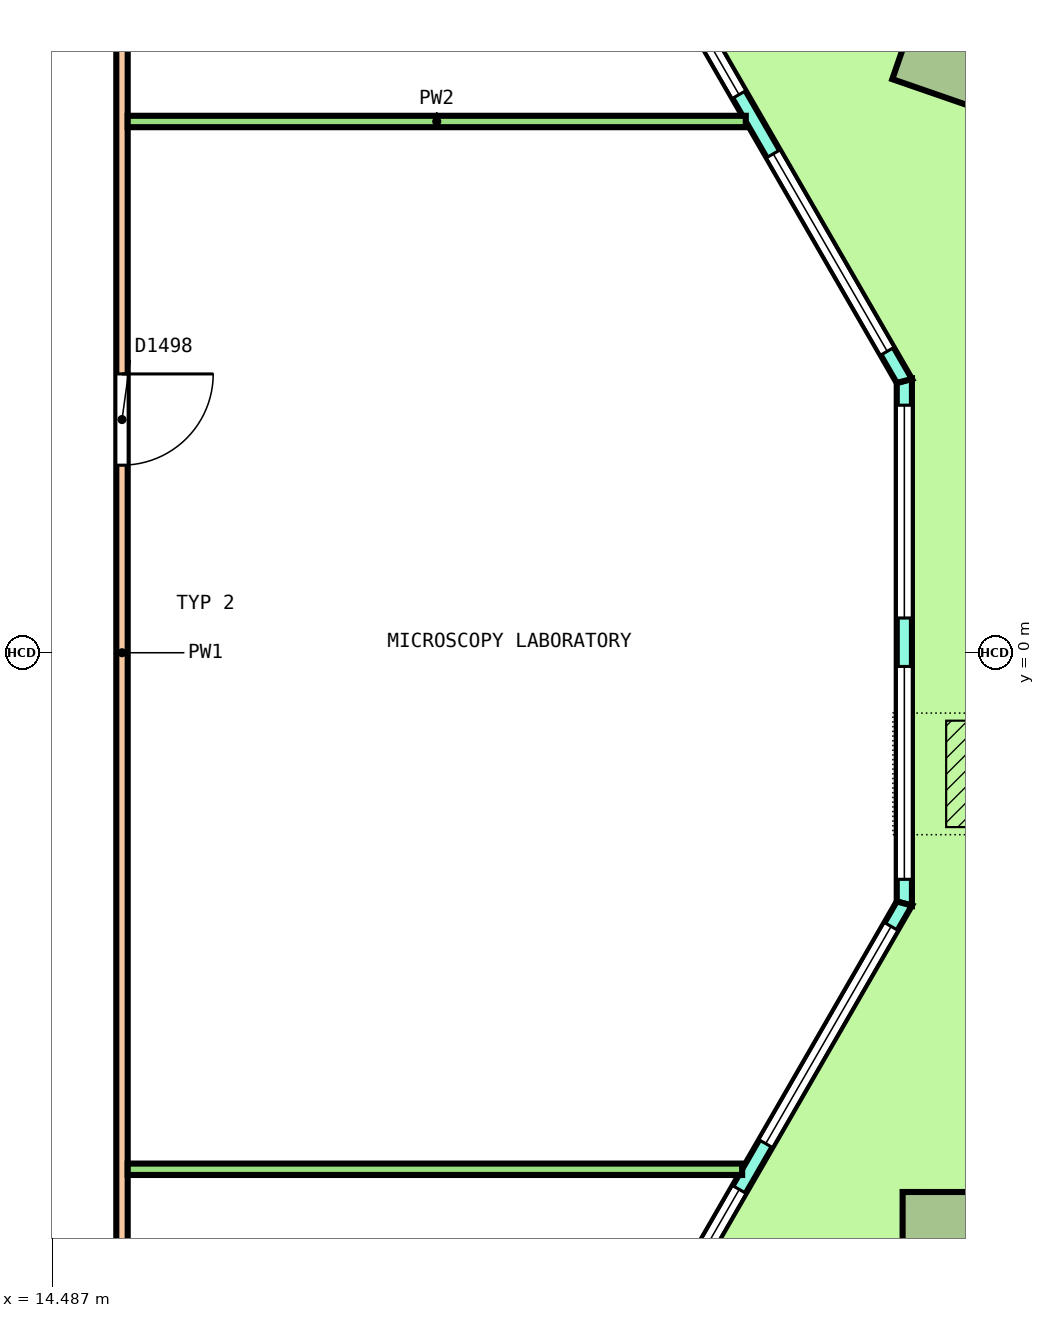
"""IFC4 building model, lengths in metres.
Left out: names, types, materials, properties, quantities, classifications, styles, units other than length and angle.
Written with IfcOpenShell. Run it as: python <this file> out.ifc"""

import sys

from ifc_helpers import new_model, si_unit, direction, frame, frame_2d, origin, origin_2d, place, context, subcontext, project, spatial, polyline, rectangle, outline, extrude, element, fill, save


model = new_model("IFC4")
c1 = context("Model", 3, precision=1e-05, world=origin(), true_north=direction((0.0, 1.0)))
c2 = subcontext(c1, "Body", "Model", "MODEL_VIEW")
j1 = project(units=[si_unit("LENGTHUNIT", "METRE"), si_unit("PLANEANGLEUNIT", "RADIAN")], contexts=[c1])
p1 = place(None, origin())
s1 = spatial("IfcSite", under=j1, at=p1, CompositionType="ELEMENT")
p2 = place(p1, origin())
s2 = spatial("IfcBuilding", under=s1, at=p2, CompositionType="ELEMENT")
p3 = place(p2, frame((0.0, 0.0, 85.2)))
s3 = spatial("IfcBuildingStorey", under=s2, at=p3, CompositionType="ELEMENT", Elevation=85.2)
p4 = place(p3, frame((26.393, 7.963, 0.0), z_axis=(0.021749390218, 0.025123256844, 0.9994477405), x_axis=(-0.500502362591, 0.865666942435, -0.01086875412)))
e1 = element("IfcColumn", 1, at=p4, inside=s3, PredefinedType="COLUMN", context=c2, shape_type="SweptSolid", body=[
    extrude(rectangle(XDim=1.35, YDim=1.35, at=origin_2d()), origin(), (0.0, 0.0, 1.0), 4.052),
])
p5 = place(p3, frame((26.345, -7.77, 0.0), z_axis=(0.010908253887, 0.018863444567, 0.99976256204), x_axis=(0.500638377412, 0.865382225109, -0.021790354016)))
e2 = element("IfcColumn", 2, at=p5, inside=s3, PredefinedType="COLUMN", context=c2, shape_type="SweptSolid", body=[
    extrude(rectangle(XDim=1.35, YDim=1.35, at=origin_2d()), origin(), (0.0, 0.0, 1.0), 4.051),
])
p6 = place(p3, frame((25.693, -3.299, 0.0), z_axis=(0.0, 0.0, 1.0), x_axis=(0.0, 1.0, 0.0)))
e3 = element("IfcWall", 3, at=p6, inside=s3, PredefinedType="SOLIDWALL", context=c2, shape_type="SweptSolid", body=[
    extrude(outline(polyline([(-0.027, -0.1), (1.128, -0.1), (2.283, -0.1), (3.438, -0.1), (4.592, -0.1), (5.747, -0.1), (6.902, -0.1), (6.848, 0.1), (5.711, 0.1), (4.574, 0.1), (3.438, 0.1), (2.301, 0.1), (1.164, 0.1), (0.027, 0.1), (-0.027, -0.1)])), origin(), (0.0, 0.0, 1.0), 4.1),
])
p7 = place(p6, frame((0.319, 0.0, 0.1)))
e4 = element("IfcOpeningElement", 4, at=p7, cuts=e3, PredefinedType="OPENING", context=c2, shape_type="SweptSolid", body=[
    extrude(rectangle(XDim=2.8, YDim=2.9, at=frame_2d((1.4, 1.45))), frame((0.0, 0.11, 0.0), z_axis=(0.0, -1.0, 0.0), x_axis=(1.0, 0.0, 0.0)), (0.0, 0.0, 1.0), 0.22),
])
p8 = place(p6, frame((3.756, 0.0, 0.1)))
e5 = element("IfcOpeningElement", 5, at=p8, cuts=e3, PredefinedType="OPENING", context=c2, shape_type="SweptSolid", body=[
    extrude(rectangle(XDim=2.8, YDim=2.9, at=frame_2d((1.4, 1.45))), frame((0.0, 0.11, 0.0), z_axis=(0.0, -1.0, 0.0), x_axis=(1.0, 0.0, 0.0)), (0.0, 0.0, 1.0), 0.22),
])
p9 = place(p3, frame((25.693, 3.576, 0.0), z_axis=(0.0, 0.0, 1.0), x_axis=(-0.500002434251, 0.866023998365, 0.0)))
e6 = element("IfcWall", 6, at=p9, inside=s3, PredefinedType="SOLIDWALL", context=c2, shape_type="SweptSolid", body=[
    extrude(outline(polyline([(-0.027, -0.1), (1.002, -0.1), (2.031, -0.1), (3.061, -0.1), (4.09, -0.1), (5.119, -0.1), (6.148, -0.1), (7.177, -0.1), (8.206, -0.1), (9.235, -0.1), (10.264, -0.1), (11.293, -0.1), (12.323, -0.1), (13.352, -0.1), (14.381, -0.1), (15.41, -0.1), (16.439, -0.1), (17.468, -0.1), (18.497, -0.1), (19.526, -0.1), (19.473, 0.1), (18.449, 0.1), (17.426, 0.1), (16.402, 0.1), (15.379, 0.1), (14.355, 0.1), (13.332, 0.1), (12.308, 0.1), (11.285, 0.1), (10.261, 0.1), (9.238, 0.1), (8.215, 0.1), (7.191, 0.1), (6.168, 0.1), (5.144, 0.1), (4.121, 0.1), (3.097, 0.1), (2.074, 0.1), (1.05, 0.1), (0.027, 0.1), (-0.027, -0.1)])), origin(), (0.0, 0.0, 1.0), 4.1),
])
p10 = place(p9, frame((0.45, 0.0, 0.1)))
e7 = element("IfcOpeningElement", 7, at=p10, cuts=e6, PredefinedType="OPENING", context=c2, shape_type="SweptSolid", body=[
    extrude(rectangle(XDim=3.0, YDim=2.9, at=frame_2d((1.5, 1.45))), frame((0.0, 0.11, 0.0), z_axis=(0.0, -1.0, 0.0), x_axis=(1.0, 0.0, 0.0)), (0.0, 0.0, 1.0), 0.22),
])
p11 = place(p9, frame((4.35, 0.0, 0.1)))
e8 = element("IfcOpeningElement", 8, at=p11, cuts=e6, PredefinedType="OPENING", context=c2, shape_type="SweptSolid", body=[
    extrude(rectangle(XDim=3.0, YDim=2.9, at=frame_2d((1.5, 1.45))), frame((0.0, 0.11, 0.0), z_axis=(0.0, -1.0, 0.0), x_axis=(1.0, 0.0, 0.0)), (0.0, 0.0, 1.0), 0.22),
])
p12 = place(p9, frame((8.85, 0.0, 0.0)))
e9 = element("IfcOpeningElement", 9, at=p12, cuts=e6, PredefinedType="OPENING", context=c2, shape_type="SweptSolid", body=[
    extrude(rectangle(XDim=1.8, YDim=2.4, at=frame_2d((0.9, 1.2))), frame((0.0, 0.11, 0.0), z_axis=(0.0, -1.0, 0.0), x_axis=(1.0, 0.0, 0.0)), (0.0, 0.0, 1.0), 0.22),
])
p13 = place(p9, frame((8.85, 0.0, 2.55)))
e10 = element("IfcOpeningElement", 10, at=p13, cuts=e6, PredefinedType="OPENING", context=c2, shape_type="SweptSolid", body=[
    extrude(rectangle(XDim=1.8, YDim=0.45, at=frame_2d((0.9, 0.225))), frame((0.0, 0.11, 0.0), z_axis=(0.0, -1.0, 0.0), x_axis=(1.0, 0.0, 0.0)), (0.0, 0.0, 1.0), 0.22),
])
p14 = place(p9, frame((12.15, 0.0, 0.1)))
e11 = element("IfcOpeningElement", 11, at=p14, cuts=e6, PredefinedType="OPENING", context=c2, shape_type="SweptSolid", body=[
    extrude(rectangle(XDim=3.0, YDim=2.9, at=frame_2d((1.5, 1.45))), frame((0.0, 0.11, 0.0), z_axis=(0.0, -1.0, 0.0), x_axis=(1.0, 0.0, 0.0)), (0.0, 0.0, 1.0), 0.22),
])
p15 = place(p9, frame((16.05, 0.0, 0.1)))
e12 = element("IfcOpeningElement", 12, at=p15, cuts=e6, PredefinedType="OPENING", context=c2, shape_type="SweptSolid", body=[
    extrude(rectangle(XDim=3.0, YDim=2.9, at=frame_2d((1.5, 1.45))), frame((0.0, 0.11, 0.0), z_axis=(0.0, -1.0, 0.0), x_axis=(1.0, 0.0, 0.0)), (0.0, 0.0, 1.0), 0.22),
])
p16 = place(p3, frame((15.703, -20.601, 0.0), z_axis=(0.0, 0.0, 1.0), x_axis=(0.499997834957, 0.866026653769, 0.0)))
e13 = element("IfcWall", 13, at=p16, inside=s3, PredefinedType="SOLIDWALL", context=c2, shape_type="SweptSolid", body=[
    extrude(outline(polyline([(-0.027, -0.1), (1.028, -0.1), (2.082, -0.1), (3.136, -0.1), (4.19, -0.1), (5.245, -0.1), (6.299, -0.1), (7.354, -0.1), (8.408, -0.1), (9.462, -0.1), (10.516, -0.1), (11.571, -0.1), (12.625, -0.1), (13.679, -0.1), (14.734, -0.1), (15.788, -0.1), (16.842, -0.1), (17.897, -0.1), (18.951, -0.1), (20.005, -0.1), (19.952, 0.1), (18.903, 0.1), (17.854, 0.1), (16.806, 0.1), (15.757, 0.1), (14.708, 0.1), (13.66, 0.1), (12.611, 0.1), (11.562, 0.1), (10.514, 0.1), (9.465, 0.1), (8.416, 0.1), (7.368, 0.1), (6.319, 0.1), (5.27, 0.1), (4.221, 0.1), (3.173, 0.1), (2.124, 0.1), (1.075, 0.1), (0.027, 0.1), (-0.027, -0.1)])), origin(), (0.0, 0.0, 1.0), 4.1),
])
p17 = place(p16, frame((0.348, 0.0, 0.1)))
e14 = element("IfcOpeningElement", 14, at=p17, cuts=e13, PredefinedType="OPENING", context=c2, shape_type="SweptSolid", body=[
    extrude(rectangle(XDim=3.3, YDim=2.9, at=frame_2d((1.65, 1.45))), frame((0.0, 0.11, 0.0), z_axis=(0.0, -1.0, 0.0), x_axis=(1.0, 0.0, 0.0)), (0.0, 0.0, 1.0), 0.22),
])
p18 = place(p16, frame((4.344, 0.0, 0.1)))
e15 = element("IfcOpeningElement", 15, at=p18, cuts=e13, PredefinedType="OPENING", context=c2, shape_type="SweptSolid", body=[
    extrude(rectangle(XDim=3.3, YDim=2.9, at=frame_2d((1.65, 1.45))), frame((0.0, 0.11, 0.0), z_axis=(0.0, -1.0, 0.0), x_axis=(1.0, 0.0, 0.0)), (0.0, 0.0, 1.0), 0.22),
])
p19 = place(p16, frame((9.089, 0.0, 0.0)))
e16 = element("IfcOpeningElement", 16, at=p19, cuts=e13, PredefinedType="OPENING", context=c2, shape_type="SweptSolid", body=[
    extrude(rectangle(XDim=1.8, YDim=2.4, at=frame_2d((0.9, 1.2))), frame((0.0, 0.11, 0.0), z_axis=(0.0, -1.0, 0.0), x_axis=(1.0, 0.0, 0.0)), (0.0, 0.0, 1.0), 0.22),
])
p20 = place(p16, frame((9.089, 0.0, 2.55)))
e17 = element("IfcOpeningElement", 17, at=p20, cuts=e13, PredefinedType="OPENING", context=c2, shape_type="SweptSolid", body=[
    extrude(rectangle(XDim=1.8, YDim=0.45, at=frame_2d((0.9, 0.225))), frame((0.0, 0.11, 0.0), z_axis=(0.0, -1.0, 0.0), x_axis=(1.0, 0.0, 0.0)), (0.0, 0.0, 1.0), 0.22),
])
p21 = place(p16, frame((12.335, 0.0, 0.1)))
e18 = element("IfcOpeningElement", 18, at=p21, cuts=e13, PredefinedType="OPENING", context=c2, shape_type="SweptSolid", body=[
    extrude(rectangle(XDim=3.3, YDim=2.9, at=frame_2d((1.65, 1.45))), frame((0.0, 0.11, 0.0), z_axis=(0.0, -1.0, 0.0), x_axis=(1.0, 0.0, 0.0)), (0.0, 0.0, 1.0), 0.22),
])
p22 = place(p16, frame((16.331, 0.0, 0.1)))
e19 = element("IfcOpeningElement", 19, at=p22, cuts=e13, PredefinedType="OPENING", context=c2, shape_type="SweptSolid", body=[
    extrude(rectangle(XDim=3.3, YDim=2.9, at=frame_2d((1.65, 1.45))), frame((0.0, 0.11, 0.0), z_axis=(0.0, -1.0, 0.0), x_axis=(1.0, 0.0, 0.0)), (0.0, 0.0, 1.0), 0.22),
])
p23 = place(p3, frame((15.4, -12.925, 0.0), z_axis=(0.0, 0.0, 1.0), x_axis=(0.0, 1.0, 0.0)))
e20 = element("IfcWall", 20, at=p23, inside=s3, PredefinedType="PARTITIONING", context=c2, shape_type="SweptSolid", body=[
    extrude(rectangle(XDim=25.85, YDim=0.15, at=frame_2d((12.925, 0.0))), origin(), (0.0, 0.0, 1.0), 3.05),
])
p24 = place(p23, frame((15.393, 0.0, 0.0)))
e21 = element("IfcOpeningElement", 21, at=p24, cuts=e20, PredefinedType="OPENING", context=c2, shape_type="SweptSolid", body=[
    extrude(rectangle(XDim=1.2, YDim=2.1, at=frame_2d((0.6, 1.05))), frame((0.0, 0.085, 0.0), z_axis=(0.0, -1.0, 0.0), x_axis=(1.0, 0.0, 0.0)), (0.0, 0.0, 1.0), 0.17),
])
p25 = place(p23, frame((22.936, 0.0, 0.0)))
e22 = element("IfcOpeningElement", 22, at=p25, cuts=e20, PredefinedType="OPENING", context=c2, shape_type="SweptSolid", body=[
    extrude(rectangle(XDim=1.2, YDim=2.1, at=frame_2d((0.6, 1.05))), frame((0.0, 0.085, 0.0), z_axis=(0.0, -1.0, 0.0), x_axis=(1.0, 0.0, 0.0)), (0.0, 0.0, 1.0), 0.17),
])
p26 = place(p23, frame((1.852, 0.0, 0.0)))
e23 = element("IfcOpeningElement", 23, at=p26, cuts=e20, PredefinedType="OPENING", context=c2, shape_type="SweptSolid", body=[
    extrude(rectangle(XDim=1.0, YDim=2.1, at=frame_2d((0.5, 1.05))), frame((0.0, 0.085, 0.0), z_axis=(0.0, -1.0, 0.0), x_axis=(1.0, 0.0, 0.0)), (0.0, 0.0, 1.0), 0.17),
])
p27 = place(p3, frame((15.475, 6.989, 0.0), z_axis=(0.0, 0.0, 1.0), x_axis=(1.0, 0.0, 0.0)))
e24 = element("IfcWall", 24, at=p27, inside=s3, PredefinedType="PARTITIONING", context=c2, shape_type="SweptSolid", body=[
    extrude(rectangle(XDim=8.131, YDim=0.15, at=frame_2d((4.066, 0.0))), origin(), (0.0, 0.0, 1.0), 3.05),
])
p28 = place(p3, frame((15.475, -6.795, 0.0), z_axis=(0.0, 0.0, 1.0), x_axis=(1.0, 0.0, 0.0)))
e25 = element("IfcWall", 25, at=p28, inside=s3, PredefinedType="PARTITIONING", context=c2, shape_type="SweptSolid", body=[
    extrude(rectangle(XDim=8.083, YDim=0.15, at=frame_2d((4.042, 0.0))), origin(), (0.0, 0.0, 1.0), 3.05),
])
p29 = place(p7, origin())
e26 = element("IfcWindow", 26, at=p29, inside=s3, PartitioningType="SINGLE_PANEL", PredefinedType="WINDOW", context=c2, shape_type="SweptSolid", body=[
    extrude(rectangle(XDim=2.8, YDim=2.9, at=frame_2d((1.4, 1.45))), frame((0.0, 0.03, 0.0), z_axis=(0.0, -1.0, 0.0), x_axis=(1.0, 0.0, 0.0)), (0.0, 0.0, 1.0), 0.06),
])
fill(e4, e26)
p30 = place(p8, origin())
e27 = element("IfcWindow", 27, at=p30, inside=s3, PartitioningType="SINGLE_PANEL", PredefinedType="WINDOW", context=c2, shape_type="SweptSolid", body=[
    extrude(rectangle(XDim=2.8, YDim=2.9, at=frame_2d((1.4, 1.45))), frame((0.0, 0.03, 0.0), z_axis=(0.0, -1.0, 0.0), x_axis=(1.0, 0.0, 0.0)), (0.0, 0.0, 1.0), 0.06),
])
fill(e5, e27)
p31 = place(p10, origin())
e28 = element("IfcWindow", 28, at=p31, inside=s3, PartitioningType="SINGLE_PANEL", PredefinedType="WINDOW", context=c2, shape_type="SweptSolid", body=[
    extrude(rectangle(XDim=3.0, YDim=2.9, at=frame_2d((1.5, 1.45))), frame((0.0, 0.03, 0.0), z_axis=(0.0, -1.0, 0.0), x_axis=(1.0, 0.0, 0.0)), (0.0, 0.0, 1.0), 0.06),
])
fill(e7, e28)
p32 = place(p11, origin())
e29 = element("IfcWindow", 29, at=p32, inside=s3, PartitioningType="SINGLE_PANEL", PredefinedType="WINDOW", context=c2, shape_type="SweptSolid", body=[
    extrude(rectangle(XDim=3.0, YDim=2.9, at=frame_2d((1.5, 1.45))), frame((0.0, 0.03, 0.0), z_axis=(0.0, -1.0, 0.0), x_axis=(1.0, 0.0, 0.0)), (0.0, 0.0, 1.0), 0.06),
])
fill(e8, e29)
p33 = place(p21, origin())
e30 = element("IfcWindow", 30, at=p33, inside=s3, PartitioningType="SINGLE_PANEL", PredefinedType="WINDOW", context=c2, shape_type="SweptSolid", body=[
    extrude(rectangle(XDim=3.3, YDim=2.9, at=frame_2d((1.65, 1.45))), frame((0.0, 0.03, 0.0), z_axis=(0.0, -1.0, 0.0), x_axis=(1.0, 0.0, 0.0)), (0.0, 0.0, 1.0), 0.06),
])
fill(e18, e30)
p34 = place(p22, origin())
e31 = element("IfcWindow", 31, at=p34, inside=s3, PartitioningType="SINGLE_PANEL", PredefinedType="WINDOW", context=c2, shape_type="SweptSolid", body=[
    extrude(rectangle(XDim=3.3, YDim=2.9, at=frame_2d((1.65, 1.45))), frame((0.0, 0.03, 0.0), z_axis=(0.0, -1.0, 0.0), x_axis=(1.0, 0.0, 0.0)), (0.0, 0.0, 1.0), 0.06),
])
fill(e19, e31)
p35 = place(p24, origin())
e32 = element("IfcDoor", 32, at=p35, inside=s3, OperationType="DOUBLE_DOOR_SINGLE_SWING", PredefinedType="DOOR", context=c2, shape_type="SweptSolid", body=[
    extrude(rectangle(XDim=1.2, YDim=2.1, at=frame_2d((0.6, 1.05))), frame((0.0, 0.025, 0.0), z_axis=(0.0, -1.0, 0.0), x_axis=(1.0, 0.0, 0.0)), (0.0, 0.0, 1.0), 0.05),
])
fill(e21, e32)
save(model, sys.argv[1])
